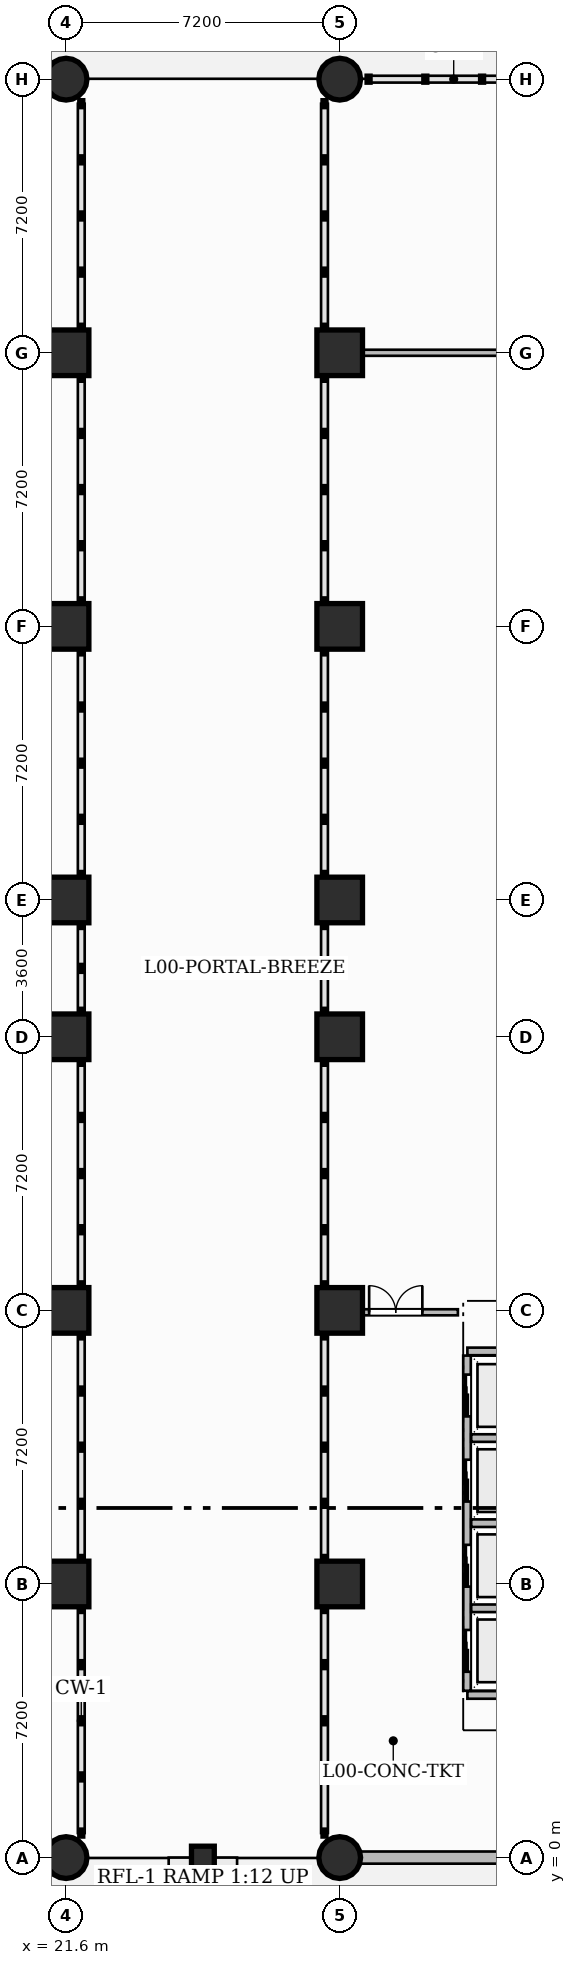
"""IFC4 building model, lengths in metres.
Left out: names, types, materials, properties, quantities, classifications, styles, units other than length and angle.
Written with IfcOpenShell. Run it as: python <this file> out.ifc"""

import sys

from ifc_helpers import new_model, si_unit, direction, frame, frame_2d, origin, origin_2d, place, context, subcontext, project, spatial, rectangle, circle, extrude, source, transform, mapped, element, fill, save


model = new_model("IFC4")
c1 = context("Model", 3, precision=1e-05, world=origin(), true_north=direction((0.0, 1.0)))
c2 = subcontext(c1, "Body", "Model", "MODEL_VIEW")
j1 = project(units=[si_unit("LENGTHUNIT", "METRE"), si_unit("PLANEANGLEUNIT", "RADIAN")], contexts=[c1])
p1 = place(None, origin())
s1 = spatial("IfcSite", under=j1, at=p1, CompositionType="ELEMENT")
p2 = place(p1, origin())
s2 = spatial("IfcBuilding", under=s1, at=p2, CompositionType="ELEMENT")
p3 = place(p2, origin())
s3 = spatial("IfcBuildingStorey", under=s2, at=p3, CompositionType="ELEMENT", Elevation=0.0)
m1 = source(origin(), c2, "Body", "SweptSolid", [
    extrude(circle(Radius=0.55, at=origin_2d()), origin(), (0.0, 0.0, 1.0), 5.4),
])
p4 = place(p3, frame((21.6, 0.0, 0.0), z_axis=(0.0, 0.0, 1.0), x_axis=(1.0, 0.0, 0.0)))
e1 = element("IfcColumn", 1, at=p4, inside=s3, PredefinedType="COLUMN", context=c2, shape_type="MappedRepresentation", body=[
    mapped(m1, transform((0.0, 0.0, 0.0), scale=1.0)),
])
m2 = source(origin(), c2, "Body", "SweptSolid", [
    extrude(rectangle(XDim=1.2, YDim=1.2, at=origin_2d()), origin(), (0.0, 0.0, 1.0), 5.4),
])
for number, where, z_axis, x_axis in (
    (2, (21.6, 7.2, 0.0), (0.0, 0.0, 1.0), (1.0, 0.0, 0.0)),
    (3, (21.6, 14.4, 0.0), (0.0, 0.0, 1.0), (1.0, 0.0, 0.0)),
    (4, (21.6, 21.6, 0.0), (0.0, 0.0, 1.0), (1.0, 0.0, 0.0)),
    (5, (21.6, 25.2, 0.0), (0.0, 0.0, 1.0), (1.0, 0.0, 0.0)),
    (6, (21.6, 32.4, 0.0), (0.0, 0.0, 1.0), (1.0, 0.0, 0.0)),
    (7, (21.6, 39.6, 0.0), (0.0, 0.0, 1.0), (1.0, 0.0, 0.0)),
):
    element("IfcColumn", number, at=place(p3, frame(where, z_axis=z_axis, x_axis=x_axis)), inside=s3, PredefinedType="COLUMN", context=c2, shape_type="MappedRepresentation", body=[
        mapped(m2, transform((0.0, 0.0, 0.0), scale=1.0)),
    ])
for number, where, z_axis, x_axis in (
    (8, (21.6, 46.8, 0.0), (0.0, 0.0, 1.0), (1.0, 0.0, 0.0)),
    (9, (28.8, 0.0, 0.0), (0.0, 0.0, 1.0), (1.0, 0.0, 0.0)),
):
    element("IfcColumn", number, at=place(p3, frame(where, z_axis=z_axis, x_axis=x_axis)), inside=s3, PredefinedType="COLUMN", context=c2, shape_type="MappedRepresentation", body=[
        mapped(m1, transform((0.0, 0.0, 0.0), scale=1.0)),
    ])
for number, where, z_axis, x_axis in (
    (10, (28.8, 7.2, 0.0), (0.0, 0.0, 1.0), (1.0, 0.0, 0.0)),
    (11, (28.8, 14.4, 0.0), (0.0, 0.0, 1.0), (1.0, 0.0, 0.0)),
    (12, (28.8, 21.6, 0.0), (0.0, 0.0, 1.0), (1.0, 0.0, 0.0)),
    (13, (28.8, 25.2, 0.0), (0.0, 0.0, 1.0), (1.0, 0.0, 0.0)),
    (14, (28.8, 32.4, 0.0), (0.0, 0.0, 1.0), (1.0, 0.0, 0.0)),
    (15, (28.8, 39.6, 0.0), (0.0, 0.0, 1.0), (1.0, 0.0, 0.0)),
):
    element("IfcColumn", number, at=place(p3, frame(where, z_axis=z_axis, x_axis=x_axis)), inside=s3, PredefinedType="COLUMN", context=c2, shape_type="MappedRepresentation", body=[
        mapped(m2, transform((0.0, 0.0, 0.0), scale=1.0)),
    ])
p5 = place(p3, frame((28.8, 46.8, 0.0), z_axis=(0.0, 0.0, 1.0), x_axis=(1.0, 0.0, 0.0)))
e16 = element("IfcColumn", 16, at=p5, inside=s3, PredefinedType="COLUMN", context=c2, shape_type="MappedRepresentation", body=[
    mapped(m1, transform((0.0, 0.0, 0.0), scale=1.0)),
])
m3 = source(origin(), c2, "Body", "SweptSolid", [
    extrude(rectangle(XDim=0.6, YDim=0.6, at=origin_2d()), origin(), (0.0, 0.0, 1.0), 5.4),
])
p6 = place(p3, frame((25.2, 0.0, 0.0), z_axis=(0.0, 0.0, 1.0), x_axis=(1.0, 0.0, 0.0)))
e17 = element("IfcColumn", 17, at=p6, inside=s3, PredefinedType="PILASTER", context=c2, shape_type="MappedRepresentation", body=[
    mapped(m3, transform((0.0, 0.0, 0.0), scale=1.0)),
])
for number, where, z_axis, x_axis in (
    (18, (32.16, 4.28, 0.0), (0.0, 0.0, 1.0), (1.0, 0.0, 0.0)),
    (19, (32.16, 13.32, 0.0), (0.0, 0.0, 1.0), (1.0, 0.0, 0.0)),
):
    element("IfcWall", number, at=place(p3, frame(where, z_axis=z_axis, x_axis=x_axis)), inside=s3, PredefinedType="PARTITIONING", context=c2, shape_type="SweptSolid", body=[
        extrude(rectangle(XDim=2.31, YDim=0.2, at=frame_2d((1.155, 0.0))), origin(), (0.0, 0.0, 1.0), 5.1),
    ])
p7 = place(p3, frame((32.15, 4.39, 0.0), z_axis=(0.0, 0.0, 1.0), x_axis=(0.0, 1.0, 0.0)))
e20 = element("IfcWall", 20, at=p7, inside=s3, PredefinedType="PARTITIONING", context=c2, shape_type="SweptSolid", body=[
    extrude(rectangle(XDim=8.82, YDim=0.2, at=frame_2d((4.41, 0.0))), origin(), (0.0, 0.0, 1.0), 5.1),
])
p8 = place(p7, frame((0.5, 0.0, 0.0)))
e21 = element("IfcOpeningElement", 21, at=p8, cuts=e20, PredefinedType="OPENING", context=c2, shape_type="SweptSolid", body=[
    extrude(rectangle(XDim=1.1, YDim=2.2, at=frame_2d((0.55, 1.1))), frame((0.0, 0.11, 0.0), z_axis=(0.0, -1.0, 0.0), x_axis=(1.0, 0.0, 0.0)), (0.0, 0.0, 1.0), 0.22),
])
p9 = place(p7, frame((2.74, 0.0, 0.0)))
e22 = element("IfcOpeningElement", 22, at=p9, cuts=e20, PredefinedType="OPENING", context=c2, shape_type="SweptSolid", body=[
    extrude(rectangle(XDim=1.1, YDim=2.2, at=frame_2d((0.55, 1.1))), frame((0.0, 0.11, 0.0), z_axis=(0.0, -1.0, 0.0), x_axis=(1.0, 0.0, 0.0)), (0.0, 0.0, 1.0), 0.22),
])
p10 = place(p7, frame((4.98, 0.0, 0.0)))
e23 = element("IfcOpeningElement", 23, at=p10, cuts=e20, PredefinedType="OPENING", context=c2, shape_type="SweptSolid", body=[
    extrude(rectangle(XDim=1.1, YDim=2.2, at=frame_2d((0.55, 1.1))), frame((0.0, 0.11, 0.0), z_axis=(0.0, -1.0, 0.0), x_axis=(1.0, 0.0, 0.0)), (0.0, 0.0, 1.0), 0.22),
])
p11 = place(p7, frame((7.22, 0.0, 0.0)))
e24 = element("IfcOpeningElement", 24, at=p11, cuts=e20, PredefinedType="OPENING", context=c2, shape_type="SweptSolid", body=[
    extrude(rectangle(XDim=1.1, YDim=2.2, at=frame_2d((0.55, 1.1))), frame((0.0, 0.11, 0.0), z_axis=(0.0, -1.0, 0.0), x_axis=(1.0, 0.0, 0.0)), (0.0, 0.0, 1.0), 0.22),
])
for number, where, z_axis, x_axis in (
    (25, (32.26, 6.56, 0.0), (0.0, 0.0, 1.0), (1.0, 0.0, 0.0)),
    (26, (32.26, 8.8, 0.0), (0.0, 0.0, 1.0), (1.0, 0.0, 0.0)),
    (27, (32.26, 11.04, 0.0), (0.0, 0.0, 1.0), (1.0, 0.0, 0.0)),
):
    element("IfcWall", number, at=place(p3, frame(where, z_axis=z_axis, x_axis=x_axis)), inside=s3, PredefinedType="PARTITIONING", context=c2, shape_type="SweptSolid", body=[
        extrude(rectangle(XDim=2.18, YDim=0.2, at=frame_2d((1.09, 0.0))), origin(), (0.0, 0.0, 1.0), 5.1),
    ])
p12 = place(p3, frame((8.69, 14.35, 0.0), z_axis=(0.0, 0.0, 1.0), x_axis=(1.0, 0.0, 0.0)))
e28 = element("IfcWall", 28, at=p12, inside=s3, PredefinedType="PARTITIONING", context=c2, shape_type="SweptSolid", body=[
    extrude(rectangle(XDim=13.07, YDim=0.16, at=frame_2d((6.535, 0.0))), origin(), (0.0, 0.0, 1.0), 4.085),
])
p13 = place(p12, frame((7.71, 0.0, 0.0)))
e29 = element("IfcOpeningElement", 29, at=p13, cuts=e28, PredefinedType="OPENING", context=c2, shape_type="SweptSolid", body=[
    extrude(rectangle(XDim=1.6, YDim=2.4, at=frame_2d((0.8, 1.2))), frame((0.0, 0.09, 0.0), z_axis=(0.0, -1.0, 0.0), x_axis=(1.0, 0.0, 0.0)), (0.0, 0.0, 1.0), 0.18),
])
p14 = place(p3, frame((28.64, 14.35, 0.0), z_axis=(0.0, 0.0, 1.0), x_axis=(1.0, 0.0, 0.0)))
e30 = element("IfcWall", 30, at=p14, inside=s3, PredefinedType="PARTITIONING", context=c2, shape_type="SweptSolid", body=[
    extrude(rectangle(XDim=3.27, YDim=0.16, at=frame_2d((1.635, 0.0))), origin(), (0.0, 0.0, 1.0), 4.085),
])
p15 = place(p14, frame((0.935, 0.0, 0.0)))
e31 = element("IfcOpeningElement", 31, at=p15, cuts=e30, PredefinedType="OPENING", context=c2, shape_type="SweptSolid", body=[
    extrude(rectangle(XDim=1.4, YDim=2.35, at=frame_2d((0.7, 1.175))), frame((0.0, 0.09, 0.0), z_axis=(0.0, -1.0, 0.0), x_axis=(1.0, 0.0, 0.0)), (0.0, 0.0, 1.0), 0.18),
])
p16 = place(p3, frame((13.84, 39.6, 0.0), z_axis=(0.0, 0.0, 1.0), x_axis=(1.0, 0.0, 0.0)))
e32 = element("IfcWall", 32, at=p16, inside=s3, PredefinedType="PARTITIONING", context=c2, shape_type="SweptSolid", body=[
    extrude(rectangle(XDim=7.92, YDim=0.16, at=frame_2d((3.96, 0.0))), origin(), (0.0, 0.0, 1.0), 4.085),
])
p17 = place(p16, frame((1.22, 0.0, 0.0)))
e33 = element("IfcOpeningElement", 33, at=p17, cuts=e32, PredefinedType="OPENING", context=c2, shape_type="SweptSolid", body=[
    extrude(rectangle(XDim=1.6, YDim=2.4, at=frame_2d((0.8, 1.2))), frame((0.0, 0.09, 0.0), z_axis=(0.0, -1.0, 0.0), x_axis=(1.0, 0.0, 0.0)), (0.0, 0.0, 1.0), 0.18),
])
p18 = place(p3, frame((28.64, 39.6, 0.0), z_axis=(0.0, 0.0, 1.0), x_axis=(1.0, 0.0, 0.0)))
e34 = element("IfcWall", 34, at=p18, inside=s3, PredefinedType="PARTITIONING", context=c2, shape_type="SweptSolid", body=[
    extrude(rectangle(XDim=43.72, YDim=0.16, at=frame_2d((21.86, 0.0))), origin(), (0.0, 0.0, 1.0), 4.085),
])
p19 = place(p18, frame((7.76, 0.0, 0.0)))
e35 = element("IfcOpeningElement", 35, at=p19, cuts=e34, PredefinedType="OPENING", context=c2, shape_type="SweptSolid", body=[
    extrude(rectangle(XDim=1.6, YDim=2.4, at=frame_2d((0.8, 1.2))), frame((0.0, 0.09, 0.0), z_axis=(0.0, -1.0, 0.0), x_axis=(1.0, 0.0, 0.0)), (0.0, 0.0, 1.0), 0.18),
])
p20 = place(p18, frame((22.835, 0.0, 0.0)))
e36 = element("IfcOpeningElement", 36, at=p20, cuts=e34, PredefinedType="OPENING", context=c2, shape_type="SweptSolid", body=[
    extrude(rectangle(XDim=0.85, YDim=2.1, at=frame_2d((0.425, 1.05))), frame((0.0, 0.09, 0.0), z_axis=(0.0, -1.0, 0.0), x_axis=(1.0, 0.0, 0.0)), (0.0, 0.0, 1.0), 0.18),
])
p21 = place(p18, frame((30.835, 0.0, 0.0)))
e37 = element("IfcOpeningElement", 37, at=p21, cuts=e34, PredefinedType="OPENING", context=c2, shape_type="SweptSolid", body=[
    extrude(rectangle(XDim=0.85, YDim=2.1, at=frame_2d((0.425, 1.05))), frame((0.0, 0.09, 0.0), z_axis=(0.0, -1.0, 0.0), x_axis=(1.0, 0.0, 0.0)), (0.0, 0.0, 1.0), 0.18),
])
p22 = place(p18, frame((37.785, 0.0, 0.0)))
e38 = element("IfcOpeningElement", 38, at=p22, cuts=e34, PredefinedType="OPENING", context=c2, shape_type="SweptSolid", body=[
    extrude(rectangle(XDim=0.95, YDim=2.15, at=frame_2d((0.475, 1.075))), frame((0.0, 0.09, 0.0), z_axis=(0.0, -1.0, 0.0), x_axis=(1.0, 0.0, 0.0)), (0.0, 0.0, 1.0), 0.18),
])
p23 = place(p3, frame((-4.8, 0.0, 0.0), z_axis=(0.0, 0.0, 1.0), x_axis=(1.0, 0.0, 0.0)))
e39 = element("IfcWall", 39, at=p23, inside=s3, PredefinedType="SOLIDWALL", context=c2, shape_type="SweptSolid", body=[
    extrude(rectangle(XDim=26.85, YDim=0.32, at=frame_2d((13.425, 0.0))), origin(), (0.0, 0.0, 1.0), 4.085),
])
p24 = place(p23, frame((6.45, 0.0, 0.0)))
e40 = element("IfcOpeningElement", 40, at=p24, cuts=e39, PredefinedType="OPENING", context=c2, shape_type="SweptSolid", body=[
    extrude(rectangle(XDim=4.0, YDim=3.2, at=frame_2d((2.0, 1.6))), frame((0.0, 0.17, 0.0), z_axis=(0.0, -1.0, 0.0), x_axis=(1.0, 0.0, 0.0)), (0.0, 0.0, 1.0), 0.34),
])
p25 = place(p23, frame((21.6, 0.0, 0.0)))
e41 = element("IfcOpeningElement", 41, at=p25, cuts=e39, PredefinedType="OPENING", context=c2, shape_type="SweptSolid", body=[
    extrude(rectangle(XDim=2.4, YDim=2.8, at=frame_2d((1.2, 1.4))), frame((0.0, 0.17, 0.0), z_axis=(0.0, -1.0, 0.0), x_axis=(1.0, 0.0, 0.0)), (0.0, 0.0, 1.0), 0.34),
])
p26 = place(p3, frame((28.35, 0.0, 0.0), z_axis=(0.0, 0.0, 1.0), x_axis=(1.0, 0.0, 0.0)))
e42 = element("IfcWall", 42, at=p26, inside=s3, PredefinedType="SOLIDWALL", context=c2, shape_type="SweptSolid", body=[
    extrude(rectangle(XDim=52.05, YDim=0.32, at=frame_2d((26.025, 0.0))), origin(), (0.0, 0.0, 1.0), 4.085),
])
p27 = place(p26, frame((24.8, 0.0, 0.0)))
e43 = element("IfcOpeningElement", 43, at=p27, cuts=e42, PredefinedType="OPENING", context=c2, shape_type="SweptSolid", body=[
    extrude(rectangle(XDim=1.1, YDim=2.2, at=frame_2d((0.55, 1.1))), frame((0.0, 0.17, 0.0), z_axis=(0.0, -1.0, 0.0), x_axis=(1.0, 0.0, 0.0)), (0.0, 0.0, 1.0), 0.34),
])
p28 = place(p26, frame((33.65, 0.0, 0.0)))
e44 = element("IfcOpeningElement", 44, at=p28, cuts=e42, PredefinedType="OPENING", context=c2, shape_type="SweptSolid", body=[
    extrude(rectangle(XDim=2.4, YDim=2.8, at=frame_2d((1.2, 1.4))), frame((0.0, 0.17, 0.0), z_axis=(0.0, -1.0, 0.0), x_axis=(1.0, 0.0, 0.0)), (0.0, 0.0, 1.0), 0.34),
])
p29 = place(p3, frame((-4.8, 46.8, 0.0), z_axis=(0.0, 0.0, 1.0), x_axis=(1.0, 0.0, 0.0)))
e45 = element("IfcWall", 45, at=p29, inside=s3, PredefinedType="SOLIDWALL", context=c2, shape_type="SweptSolid", body=[
    extrude(rectangle(XDim=26.85, YDim=0.32, at=frame_2d((13.425, 0.0))), origin(), (0.0, 0.0, 1.0), 4.085),
])
m4 = source(origin(), c2, "Body", "SweptSolid", [
    extrude(rectangle(XDim=1.4, YDim=2.35, at=frame_2d((0.7, 1.175))), frame((0.0, 0.025, 0.0), z_axis=(0.0, -1.0, 0.0), x_axis=(1.0, 0.0, 0.0)), (0.0, 0.0, 1.0), 0.05),
])
p30 = place(p15, origin())
e46 = element("IfcDoor", 46, at=p30, inside=s3, OperationType="DOUBLE_DOOR_SINGLE_SWING", PredefinedType="DOOR", context=c2, shape_type="MappedRepresentation", body=[
    mapped(m4, transform((0.0, 0.0, 0.0), scale=1.0)),
])
fill(e31, e46)
m5 = source(origin(), c2, "Body", "SweptSolid", [
    extrude(rectangle(XDim=1.1, YDim=2.2, at=frame_2d((0.55, 1.1))), frame((0.0, 0.025, 0.0), z_axis=(0.0, -1.0, 0.0), x_axis=(1.0, 0.0, 0.0)), (0.0, 0.0, 1.0), 0.05),
])
p31 = place(p8, origin())
e47 = element("IfcDoor", 47, at=p31, inside=s3, OperationType="SLIDING_TO_LEFT", PredefinedType="DOOR", context=c2, shape_type="MappedRepresentation", body=[
    mapped(m5, transform((0.0, 0.0, 0.0), scale=1.0)),
])
fill(e21, e47)
p32 = place(p9, origin())
e48 = element("IfcDoor", 48, at=p32, inside=s3, OperationType="SLIDING_TO_LEFT", PredefinedType="DOOR", context=c2, shape_type="MappedRepresentation", body=[
    mapped(m5, transform((0.0, 0.0, 0.0), scale=1.0)),
])
fill(e22, e48)
p33 = place(p10, origin())
e49 = element("IfcDoor", 49, at=p33, inside=s3, OperationType="SLIDING_TO_LEFT", PredefinedType="DOOR", context=c2, shape_type="MappedRepresentation", body=[
    mapped(m5, transform((0.0, 0.0, 0.0), scale=1.0)),
])
fill(e23, e49)
p34 = place(p11, origin())
e50 = element("IfcDoor", 50, at=p34, inside=s3, OperationType="SLIDING_TO_LEFT", PredefinedType="DOOR", context=c2, shape_type="MappedRepresentation", body=[
    mapped(m5, transform((0.0, 0.0, 0.0), scale=1.0)),
])
fill(e24, e50)
save(model, sys.argv[1])
